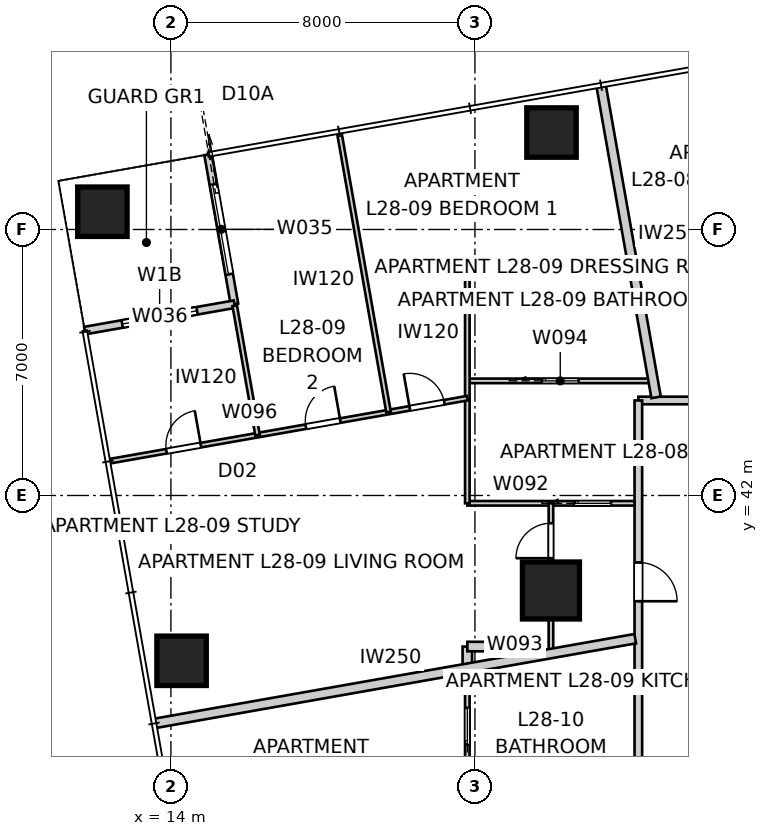
"""IFC4 building model, lengths in metres.
Left out: names, types, materials, properties, quantities, classifications, styles, units other than length and angle.
Written with IfcOpenShell. Run it as: python <this file> out.ifc"""

import sys

from ifc_helpers import new_model, si_unit, direction, frame, frame_2d, origin, origin_2d, place, context, subcontext, project, spatial, rectangle, extrude, element, fill, save


model = new_model("IFC4")
c1 = context("Model", 3, precision=1e-05, world=origin(), true_north=direction((0.0, 1.0)))
c2 = subcontext(c1, "Body", "Model", "MODEL_VIEW")
j1 = project(units=[si_unit("LENGTHUNIT", "METRE"), si_unit("PLANEANGLEUNIT", "RADIAN")], contexts=[c1])
p1 = place(None, origin())
s1 = spatial("IfcSite", under=j1, at=p1, CompositionType="ELEMENT")
p2 = place(p1, origin())
s2 = spatial("IfcBuilding", under=s1, at=p2, CompositionType="ELEMENT")
p3 = place(p2, frame((0.0, 0.0, 103.2)))
s3 = spatial("IfcBuildingStorey", under=s2, at=p3, CompositionType="ELEMENT", Elevation=103.2)
for number, where, z_axis, x_axis in (
    (1, (24.015, 51.552, 0.0), (0.0, 0.0, 1.0), (1.0, 0.0, 0.0)),
    (2, (12.197, 49.468, 0.0), (0.0, 0.0, 1.0), (1.0, 0.0, 0.0)),
    (3, (14.281, 37.65, 0.0), (0.0, 0.0, 1.0), (1.0, 0.0, 0.0)),
):
    element("IfcColumn", number, at=place(p3, frame(where, z_axis=z_axis, x_axis=x_axis)), inside=s3, PredefinedType="COLUMN", context=c2, shape_type="SweptSolid", body=[
        extrude(rectangle(XDim=1.3, YDim=1.3, at=origin_2d()), origin(), (0.0, 0.0, 1.0), 3.2),
    ])
p4 = place(p3, frame((24.0, 39.5, 0.0), z_axis=(0.0, 0.0, 1.0), x_axis=(1.0, 0.0, 0.0)))
e4 = element("IfcColumn", 4, at=p4, inside=s3, PredefinedType="COLUMN", context=c2, shape_type="SweptSolid", body=[
    extrude(rectangle(XDim=1.5, YDim=1.5, at=origin_2d()), origin(), (0.0, 0.0, 1.0), 3.4),
])
p5 = place(p3, frame((14.978, 50.974, 0.0), z_axis=(0.0, 0.0, 1.0), x_axis=(0.173646056486, -0.984808127031, 0.0)))
e5 = element("IfcWall", 5, at=p5, inside=s3, PredefinedType="SOLIDWALL", context=c2, shape_type="SweptSolid", body=[
    extrude(rectangle(XDim=4.0, YDim=0.2, at=frame_2d((2.0, 0.0))), origin(), (0.0, 0.0, 1.0), 3.2),
])
p6 = place(p5, frame((0.8, 0.0, 0.0)))
e6 = element("IfcOpeningElement", 6, at=p6, cuts=e5, PredefinedType="OPENING", context=c2, shape_type="SweptSolid", body=[
    extrude(rectangle(XDim=2.4, YDim=2.1, at=frame_2d((1.2, 1.05))), frame((0.0, 0.11, 0.0), z_axis=(0.0, -1.0, 0.0), x_axis=(1.0, 0.0, 0.0)), (0.0, 0.0, 1.0), 0.22),
])
p7 = place(p3, frame((15.672, 47.034, 0.0), z_axis=(0.0, 0.0, 1.0), x_axis=(-0.984808127031, -0.173646056486, 0.0)))
e7 = element("IfcWall", 7, at=p7, inside=s3, PredefinedType="SOLIDWALL", context=c2, shape_type="SweptSolid", body=[
    extrude(rectangle(XDim=4.0, YDim=0.2, at=frame_2d((2.0, 0.0))), origin(), (0.0, 0.0, 1.0), 3.2),
])
p8 = place(p7, frame((1.0, 0.0, 0.4)))
e8 = element("IfcOpeningElement", 8, at=p8, cuts=e7, PredefinedType="OPENING", context=c2, shape_type="SweptSolid", body=[
    extrude(rectangle(XDim=2.0, YDim=1.8, at=frame_2d((1.0, 0.9))), frame((0.0, 0.11, 0.0), z_axis=(0.0, -1.0, 0.0), x_axis=(1.0, 0.0, 0.0)), (0.0, 0.0, 1.0), 0.22),
])
p9 = place(p3, frame((53.7, 44.5, 0.0), z_axis=(0.0, 0.0, 1.0), x_axis=(-1.0, 0.0, 0.0)))
e9 = element("IfcWall", 9, at=p9, inside=s3, PredefinedType="PARTITIONING", context=c2, shape_type="SweptSolid", body=[
    extrude(rectangle(XDim=27.4, YDim=0.2, at=frame_2d((13.7, 0.0))), origin(), (0.0, 0.0, 1.0), 3.2),
])
p10 = place(p9, frame((24.356, 0.0, 0.0)))
e10 = element("IfcOpeningElement", 10, at=p10, cuts=e9, PredefinedType="OPENING", context=c2, shape_type="SweptSolid", body=[
    extrude(rectangle(XDim=1.02, YDim=2.0, at=frame_2d((0.51, 1.0))), frame((0.0, 0.11, 0.0), z_axis=(0.0, -1.0, 0.0), x_axis=(1.0, 0.0, 0.0)), (0.0, 0.0, 1.0), 0.22),
])
p11 = place(p9, frame((2.005, 0.0, 0.0)))
e11 = element("IfcOpeningElement", 11, at=p11, cuts=e9, PredefinedType="OPENING", context=c2, shape_type="SweptSolid", body=[
    extrude(rectangle(XDim=1.02, YDim=2.0, at=frame_2d((0.51, 1.0))), frame((0.0, 0.11, 0.0), z_axis=(0.0, -1.0, 0.0), x_axis=(1.0, 0.0, 0.0)), (0.0, 0.0, 1.0), 0.22),
])
p12 = place(p3, frame((26.3, 44.5, 0.0), z_axis=(0.0, 0.0, 1.0), x_axis=(0.0, -1.0, 0.0)))
e12 = element("IfcWall", 12, at=p12, inside=s3, PredefinedType="PARTITIONING", context=c2, shape_type="SweptSolid", body=[
    extrude(rectangle(XDim=29.0, YDim=0.2, at=frame_2d((14.5, 0.0))), origin(), (0.0, 0.0, 1.0), 3.2),
])
p13 = place(p12, frame((14.257, 0.0, 0.0)))
e13 = element("IfcOpeningElement", 13, at=p13, cuts=e12, PredefinedType="OPENING", context=c2, shape_type="SweptSolid", body=[
    extrude(rectangle(XDim=1.02, YDim=2.34, at=frame_2d((0.51, 1.17))), frame((0.0, 0.11, 0.0), z_axis=(0.0, -1.0, 0.0), x_axis=(1.0, 0.0, 0.0)), (0.0, 0.0, 1.0), 0.22),
])
p14 = place(p12, frame((18.322, 0.0, 0.0)))
e14 = element("IfcOpeningElement", 14, at=p14, cuts=e12, PredefinedType="OPENING", context=c2, shape_type="SweptSolid", body=[
    extrude(rectangle(XDim=1.02, YDim=2.34, at=frame_2d((0.51, 1.17))), frame((0.0, 0.11, 0.0), z_axis=(0.0, -1.0, 0.0), x_axis=(1.0, 0.0, 0.0)), (0.0, 0.0, 1.0), 0.22),
])
p15 = place(p12, frame((4.263, 0.0, 0.0)))
e15 = element("IfcOpeningElement", 15, at=p15, cuts=e12, PredefinedType="OPENING", context=c2, shape_type="SweptSolid", body=[
    extrude(rectangle(XDim=1.02, YDim=2.34, at=frame_2d((0.51, 1.17))), frame((0.0, 0.11, 0.0), z_axis=(0.0, -1.0, 0.0), x_axis=(1.0, 0.0, 0.0)), (0.0, 0.0, 1.0), 0.22),
])
p16 = place(p3, frame((25.318, 52.797, 0.0), z_axis=(0.0, 0.0, 1.0), x_axis=(0.173651756605, -0.984807121942, 0.0)))
e16 = element("IfcWall", 16, at=p16, inside=s3, PredefinedType="PARTITIONING", context=c2, shape_type="SweptSolid", body=[
    extrude(rectangle(XDim=8.341, YDim=0.25, at=frame_2d((4.171, 0.0))), origin(), (0.0, 0.0, 1.0), 3.2),
])
p17 = place(p3, frame((13.556, 35.999, 0.0), z_axis=(0.0, 0.0, 1.0), x_axis=(0.984809355703, 0.173639088111, 0.0)))
e17 = element("IfcWall", 17, at=p17, inside=s3, PredefinedType="PARTITIONING", context=c2, shape_type="SweptSolid", body=[
    extrude(rectangle(XDim=12.857, YDim=0.25, at=frame_2d((6.428, 0.0))), origin(), (0.0, 0.0, 1.0), 3.2),
])
p18 = place(p3, frame((21.8, 11.8, 0.0), z_axis=(0.0, 0.0, 1.0), x_axis=(0.0, 1.0, 0.0)))
e18 = element("IfcWall", 18, at=p18, inside=s3, PredefinedType="PARTITIONING", context=c2, shape_type="SweptSolid", body=[
    extrude(rectangle(XDim=25.653, YDim=0.12, at=frame_2d((12.826, 0.0))), origin(), (0.0, 0.0, 1.0), 3.2),
])
p19 = place(p18, frame((16.333, 0.0, 0.0)))
e19 = element("IfcOpeningElement", 19, at=p19, cuts=e18, PredefinedType="OPENING", context=c2, shape_type="SweptSolid", body=[
    extrude(rectangle(XDim=0.92, YDim=2.34, at=frame_2d((0.46, 1.17))), frame((0.0, 0.07, 0.0), z_axis=(0.0, -1.0, 0.0), x_axis=(1.0, 0.0, 0.0)), (0.0, 0.0, 1.0), 0.14),
])
p20 = place(p18, frame((18.821, 0.0, 0.0)))
e20 = element("IfcOpeningElement", 20, at=p20, cuts=e18, PredefinedType="OPENING", context=c2, shape_type="SweptSolid", body=[
    extrude(rectangle(XDim=0.92, YDim=2.34, at=frame_2d((0.46, 1.17))), frame((0.0, 0.07, 0.0), z_axis=(0.0, -1.0, 0.0), x_axis=(1.0, 0.0, 0.0)), (0.0, 0.0, 1.0), 0.14),
])
p21 = place(p18, frame((12.401, 0.0, 0.0)))
e21 = element("IfcOpeningElement", 21, at=p21, cuts=e18, PredefinedType="OPENING", context=c2, shape_type="SweptSolid", body=[
    extrude(rectangle(XDim=0.92, YDim=2.34, at=frame_2d((0.46, 1.17))), frame((0.0, 0.07, 0.0), z_axis=(0.0, -1.0, 0.0), x_axis=(1.0, 0.0, 0.0)), (0.0, 0.0, 1.0), 0.14),
])
p22 = place(p18, frame((2.066, 0.0, 0.0)))
e22 = element("IfcOpeningElement", 22, at=p22, cuts=e18, PredefinedType="OPENING", context=c2, shape_type="SweptSolid", body=[
    extrude(rectangle(XDim=0.92, YDim=2.34, at=frame_2d((0.46, 1.17))), frame((0.0, 0.07, 0.0), z_axis=(0.0, -1.0, 0.0), x_axis=(1.0, 0.0, 0.0)), (0.0, 0.0, 1.0), 0.14),
])
p23 = place(p18, frame((23.651, 0.0, 0.0)))
e23 = element("IfcOpeningElement", 23, at=p23, cuts=e18, PredefinedType="OPENING", context=c2, shape_type="SweptSolid", body=[
    extrude(rectangle(XDim=0.96, YDim=2.1, at=frame_2d((0.48, 1.05))), frame((0.0, 0.07, 0.0), z_axis=(0.0, -1.0, 0.0), x_axis=(1.0, 0.0, 0.0)), (0.0, 0.0, 1.0), 0.14),
])
p24 = place(p3, frame((21.8, 37.478, 0.0), z_axis=(0.0, 0.0, 1.0), x_axis=(0.0, 1.0, 0.0)))
e24 = element("IfcWall", 24, at=p24, inside=s3, PredefinedType="PARTITIONING", context=c2, shape_type="SweptSolid", body=[
    extrude(rectangle(XDim=0.547, YDim=0.25, at=frame_2d((0.273, 0.0))), origin(), (0.0, 0.0, 1.0), 3.2),
])
p25 = place(p3, frame((21.8, 38.025, 0.0), z_axis=(0.0, 0.0, 1.0), x_axis=(1.0, 0.0, 0.0)))
e25 = element("IfcWall", 25, at=p25, inside=s3, PredefinedType="PARTITIONING", context=c2, shape_type="SweptSolid", body=[
    extrude(rectangle(XDim=1.861, YDim=0.25, at=frame_2d((0.93, 0.0))), origin(), (0.0, 0.0, 1.0), 3.2),
])
p26 = place(p3, frame((21.8, 48.2, 0.0), z_axis=(0.0, 0.0, 1.0), x_axis=(1.0, 0.0, 0.0)))
e26 = element("IfcWall", 26, at=p26, inside=s3, PredefinedType="PARTITIONING", context=c2, shape_type="SweptSolid", body=[
    extrude(rectangle(XDim=36.4, YDim=0.12, at=frame_2d((18.2, 0.0))), origin(), (0.0, 0.0, 1.0), 3.2),
])
p27 = place(p26, frame((7.441, 0.0, 0.0)))
e27 = element("IfcOpeningElement", 27, at=p27, cuts=e26, PredefinedType="OPENING", context=c2, shape_type="SweptSolid", body=[
    extrude(rectangle(XDim=0.92, YDim=2.34, at=frame_2d((0.46, 1.17))), frame((0.0, 0.07, 0.0), z_axis=(0.0, -1.0, 0.0), x_axis=(1.0, 0.0, 0.0)), (0.0, 0.0, 1.0), 0.14),
])
p28 = place(p26, frame((28.144, 0.0, 0.0)))
e28 = element("IfcOpeningElement", 28, at=p28, cuts=e26, PredefinedType="OPENING", context=c2, shape_type="SweptSolid", body=[
    extrude(rectangle(XDim=0.92, YDim=2.34, at=frame_2d((0.46, 1.17))), frame((0.0, 0.07, 0.0), z_axis=(0.0, -1.0, 0.0), x_axis=(1.0, 0.0, 0.0)), (0.0, 0.0, 1.0), 0.14),
])
p29 = place(p26, frame((12.29, 0.0, 0.0)))
e29 = element("IfcOpeningElement", 29, at=p29, cuts=e26, PredefinedType="OPENING", context=c2, shape_type="SweptSolid", body=[
    extrude(rectangle(XDim=0.92, YDim=2.34, at=frame_2d((0.46, 1.17))), frame((0.0, 0.07, 0.0), z_axis=(0.0, -1.0, 0.0), x_axis=(1.0, 0.0, 0.0)), (0.0, 0.0, 1.0), 0.14),
])
p30 = place(p26, frame((15.505, 0.0, 0.0)))
e30 = element("IfcOpeningElement", 30, at=p30, cuts=e26, PredefinedType="OPENING", context=c2, shape_type="SweptSolid", body=[
    extrude(rectangle(XDim=0.96, YDim=2.1, at=frame_2d((0.48, 1.05))), frame((0.0, 0.07, 0.0), z_axis=(0.0, -1.0, 0.0), x_axis=(1.0, 0.0, 0.0)), (0.0, 0.0, 1.0), 0.14),
])
p31 = place(p26, frame((18.991, 0.0, 0.0)))
e31 = element("IfcOpeningElement", 31, at=p31, cuts=e26, PredefinedType="OPENING", context=c2, shape_type="SweptSolid", body=[
    extrude(rectangle(XDim=0.96, YDim=2.1, at=frame_2d((0.48, 1.05))), frame((0.0, 0.07, 0.0), z_axis=(0.0, -1.0, 0.0), x_axis=(1.0, 0.0, 0.0)), (0.0, 0.0, 1.0), 0.14),
])
p32 = place(p3, frame((21.8, 41.795, 0.0), z_axis=(0.0, 0.0, 1.0), x_axis=(1.0, 0.0, 0.0)))
e32 = element("IfcWall", 32, at=p32, inside=s3, PredefinedType="PARTITIONING", context=c2, shape_type="SweptSolid", body=[
    extrude(rectangle(XDim=4.4, YDim=0.12, at=frame_2d((2.2, 0.0))), origin(), (0.0, 0.0, 1.0), 3.2),
])
p33 = place(p32, frame((2.82, 0.0, 0.0)))
e33 = element("IfcOpeningElement", 33, at=p33, cuts=e32, PredefinedType="OPENING", context=c2, shape_type="SweptSolid", body=[
    extrude(rectangle(XDim=0.96, YDim=2.1, at=frame_2d((0.48, 1.05))), frame((0.0, 0.07, 0.0), z_axis=(0.0, -1.0, 0.0), x_axis=(1.0, 0.0, 0.0)), (0.0, 0.0, 1.0), 0.14),
])
p34 = place(p3, frame((24.0, 37.948, 0.0), z_axis=(0.0, 0.0, 1.0), x_axis=(0.0, 1.0, 0.0)))
e34 = element("IfcWall", 34, at=p34, inside=s3, PredefinedType="PARTITIONING", context=c2, shape_type="SweptSolid", body=[
    extrude(rectangle(XDim=3.847, YDim=0.12, at=frame_2d((1.923, 0.0))), origin(), (0.0, 0.0, 1.0), 2.2),
])
p35 = place(p34, frame((2.402, 0.0, 0.0)))
e35 = element("IfcOpeningElement", 35, at=p35, cuts=e34, PredefinedType="OPENING", context=c2, shape_type="SweptSolid", body=[
    extrude(rectangle(XDim=0.92, YDim=2.0, at=frame_2d((0.46, 1.0))), frame((0.0, 0.07, 0.0), z_axis=(0.0, -1.0, 0.0), x_axis=(1.0, 0.0, 0.0)), (0.0, 0.0, 1.0), 0.14),
])
p36 = place(p3, frame((21.8, 45.017, 0.0), z_axis=(0.0, 0.0, 1.0), x_axis=(1.0, 0.0, 0.0)))
e36 = element("IfcWall", 36, at=p36, inside=s3, PredefinedType="PARTITIONING", context=c2, shape_type="SweptSolid", body=[
    extrude(rectangle(XDim=4.89, YDim=0.12, at=frame_2d((2.445, 0.0))), origin(), (0.0, 0.0, 1.0), 3.2),
])
p37 = place(p36, frame((1.965, 0.0, 0.0)))
e37 = element("IfcOpeningElement", 37, at=p37, cuts=e36, PredefinedType="OPENING", context=c2, shape_type="SweptSolid", body=[
    extrude(rectangle(XDim=0.96, YDim=2.1, at=frame_2d((0.48, 1.05))), frame((0.0, 0.07, 0.0), z_axis=(0.0, -1.0, 0.0), x_axis=(1.0, 0.0, 0.0)), (0.0, 0.0, 1.0), 0.14),
])
p38 = place(p3, frame((21.8, 41.795, 0.0), z_axis=(0.0, 0.0, 1.0), x_axis=(0.0, 1.0, 0.0)))
e38 = element("IfcWall", 38, at=p38, inside=s3, PredefinedType="PARTITIONING", context=c2, shape_type="SweptSolid", body=[
    extrude(rectangle(XDim=6.405, YDim=0.12, at=frame_2d((3.203, 0.0))), origin(), (0.0, 0.0, 1.0), 3.2),
])
p39 = place(p3, frame((12.38, 42.9, 0.0), z_axis=(0.0, 0.0, 1.0), x_axis=(0.984808730291, 0.173642635155, 0.0)))
e39 = element("IfcWall", 39, at=p39, inside=s3, PredefinedType="PARTITIONING", context=c2, shape_type="SweptSolid", body=[
    extrude(rectangle(XDim=9.565, YDim=0.12, at=frame_2d((4.782, 0.0))), origin(), (0.0, 0.0, 1.0), 3.2),
])
p40 = place(p39, frame((1.525, 0.0, 0.0)))
e40 = element("IfcOpeningElement", 40, at=p40, cuts=e39, PredefinedType="OPENING", context=c2, shape_type="SweptSolid", body=[
    extrude(rectangle(XDim=0.92, YDim=2.34, at=frame_2d((0.46, 1.17))), frame((0.0, 0.07, 0.0), z_axis=(0.0, -1.0, 0.0), x_axis=(1.0, 0.0, 0.0)), (0.0, 0.0, 1.0), 0.14),
])
p41 = place(p39, frame((5.25, 0.0, 0.0)))
e41 = element("IfcOpeningElement", 41, at=p41, cuts=e39, PredefinedType="OPENING", context=c2, shape_type="SweptSolid", body=[
    extrude(rectangle(XDim=0.92, YDim=2.34, at=frame_2d((0.46, 1.17))), frame((0.0, 0.07, 0.0), z_axis=(0.0, -1.0, 0.0), x_axis=(1.0, 0.0, 0.0)), (0.0, 0.0, 1.0), 0.14),
])
p42 = place(p39, frame((8.028, 0.0, 0.0)))
e42 = element("IfcOpeningElement", 42, at=p42, cuts=e39, PredefinedType="OPENING", context=c2, shape_type="SweptSolid", body=[
    extrude(rectangle(XDim=0.92, YDim=2.0, at=frame_2d((0.46, 1.0))), frame((0.0, 0.07, 0.0), z_axis=(0.0, -1.0, 0.0), x_axis=(1.0, 0.0, 0.0)), (0.0, 0.0, 1.0), 0.14),
])
p43 = place(p3, frame((19.727, 44.195, 0.0), z_axis=(0.0, 0.0, 1.0), x_axis=(-0.173647177755, 0.984807929323, 0.0)))
e43 = element("IfcWall", 43, at=p43, inside=s3, PredefinedType="PARTITIONING", context=c2, shape_type="SweptSolid", body=[
    extrude(rectangle(XDim=7.46, YDim=0.12, at=frame_2d((3.73, 0.0))), origin(), (0.0, 0.0, 1.0), 3.2),
])
p44 = place(p3, frame((16.28, 43.588, 0.0), z_axis=(0.0, 0.0, 1.0), x_axis=(-0.173660541335, 0.984805572884, 0.0)))
e44 = element("IfcWall", 44, at=p44, inside=s3, PredefinedType="PARTITIONING", context=c2, shape_type="SweptSolid", body=[
    extrude(rectangle(XDim=3.46, YDim=0.12, at=frame_2d((1.73, 0.0))), origin(), (0.0, 0.0, 1.0), 3.2),
])
p45 = place(p6, origin())
e45 = element("IfcDoor", 45, at=p45, inside=s3, OperationType="SLIDING_TO_LEFT", PredefinedType="DOOR", context=c2, shape_type="SweptSolid", body=[
    extrude(rectangle(XDim=2.4, YDim=2.1, at=frame_2d((1.2, 1.05))), frame((0.0, 0.025, 0.0), z_axis=(0.0, -1.0, 0.0), x_axis=(1.0, 0.0, 0.0)), (0.0, 0.0, 1.0), 0.05),
])
fill(e6, e45)
p46 = place(p8, origin())
e46 = element("IfcWindow", 46, at=p46, inside=s3, PartitioningType="SINGLE_PANEL", PredefinedType="WINDOW", context=c2, shape_type="SweptSolid", body=[
    extrude(rectangle(XDim=2.0, YDim=1.8, at=frame_2d((1.0, 0.9))), frame((0.0, 0.03, 0.0), z_axis=(0.0, -1.0, 0.0), x_axis=(1.0, 0.0, 0.0)), (0.0, 0.0, 1.0), 0.06),
])
fill(e8, e46)
p47 = place(p15, origin())
e47 = element("IfcDoor", 47, at=p47, inside=s3, OperationType="SINGLE_SWING_RIGHT", PredefinedType="DOOR", context=c2, shape_type="SweptSolid", body=[
    extrude(rectangle(XDim=1.02, YDim=2.34, at=frame_2d((0.51, 1.17))), frame((0.0, 0.025, 0.0), z_axis=(0.0, -1.0, 0.0), x_axis=(1.0, 0.0, 0.0)), (0.0, 0.0, 1.0), 0.05),
])
fill(e15, e47)
p48 = place(p35, origin())
e48 = element("IfcDoor", 48, at=p48, inside=s3, OperationType="SINGLE_SWING_LEFT", PredefinedType="DOOR", context=c2, shape_type="SweptSolid", body=[
    extrude(rectangle(XDim=0.92, YDim=2.0, at=frame_2d((0.46, 1.0))), frame((0.0, 0.025, 0.0), z_axis=(0.0, -1.0, 0.0), x_axis=(1.0, 0.0, 0.0)), (0.0, 0.0, 1.0), 0.05),
])
fill(e35, e48)
p49 = place(p33, origin())
e49 = element("IfcDoor", 49, at=p49, inside=s3, OperationType="SLIDING_TO_LEFT", PredefinedType="DOOR", context=c2, shape_type="SweptSolid", body=[
    extrude(rectangle(XDim=0.96, YDim=2.1, at=frame_2d((0.48, 1.05))), frame((0.0, 0.025, 0.0), z_axis=(0.0, -1.0, 0.0), x_axis=(1.0, 0.0, 0.0)), (0.0, 0.0, 1.0), 0.05),
])
fill(e33, e49)
p50 = place(p40, origin())
e50 = element("IfcDoor", 50, at=p50, inside=s3, OperationType="SINGLE_SWING_RIGHT", PredefinedType="DOOR", context=c2, shape_type="SweptSolid", body=[
    extrude(rectangle(XDim=0.92, YDim=2.34, at=frame_2d((0.46, 1.17))), frame((0.0, 0.025, 0.0), z_axis=(0.0, -1.0, 0.0), x_axis=(1.0, 0.0, 0.0)), (0.0, 0.0, 1.0), 0.05),
])
fill(e40, e50)
p51 = place(p41, origin())
e51 = element("IfcDoor", 51, at=p51, inside=s3, OperationType="SINGLE_SWING_RIGHT", PredefinedType="DOOR", context=c2, shape_type="SweptSolid", body=[
    extrude(rectangle(XDim=0.92, YDim=2.34, at=frame_2d((0.46, 1.17))), frame((0.0, 0.025, 0.0), z_axis=(0.0, -1.0, 0.0), x_axis=(1.0, 0.0, 0.0)), (0.0, 0.0, 1.0), 0.05),
])
fill(e41, e51)
p52 = place(p42, origin())
e52 = element("IfcDoor", 52, at=p52, inside=s3, OperationType="SINGLE_SWING_LEFT", PredefinedType="DOOR", context=c2, shape_type="SweptSolid", body=[
    extrude(rectangle(XDim=0.92, YDim=2.0, at=frame_2d((0.46, 1.0))), frame((0.0, 0.025, 0.0), z_axis=(0.0, -1.0, 0.0), x_axis=(1.0, 0.0, 0.0)), (0.0, 0.0, 1.0), 0.05),
])
fill(e42, e52)
p53 = place(p37, origin())
e53 = element("IfcDoor", 53, at=p53, inside=s3, OperationType="SLIDING_TO_LEFT", PredefinedType="DOOR", context=c2, shape_type="SweptSolid", body=[
    extrude(rectangle(XDim=0.96, YDim=2.1, at=frame_2d((0.48, 1.05))), frame((0.0, 0.025, 0.0), z_axis=(0.0, -1.0, 0.0), x_axis=(1.0, 0.0, 0.0)), (0.0, 0.0, 1.0), 0.05),
])
fill(e37, e53)
p54 = place(p23, origin())
e54 = element("IfcDoor", 54, at=p54, inside=s3, OperationType="SLIDING_TO_LEFT", PredefinedType="DOOR", context=c2, shape_type="SweptSolid", body=[
    extrude(rectangle(XDim=0.96, YDim=2.1, at=frame_2d((0.48, 1.05))), frame((0.0, 0.025, 0.0), z_axis=(0.0, -1.0, 0.0), x_axis=(1.0, 0.0, 0.0)), (0.0, 0.0, 1.0), 0.05),
])
fill(e23, e54)
save(model, sys.argv[1])
